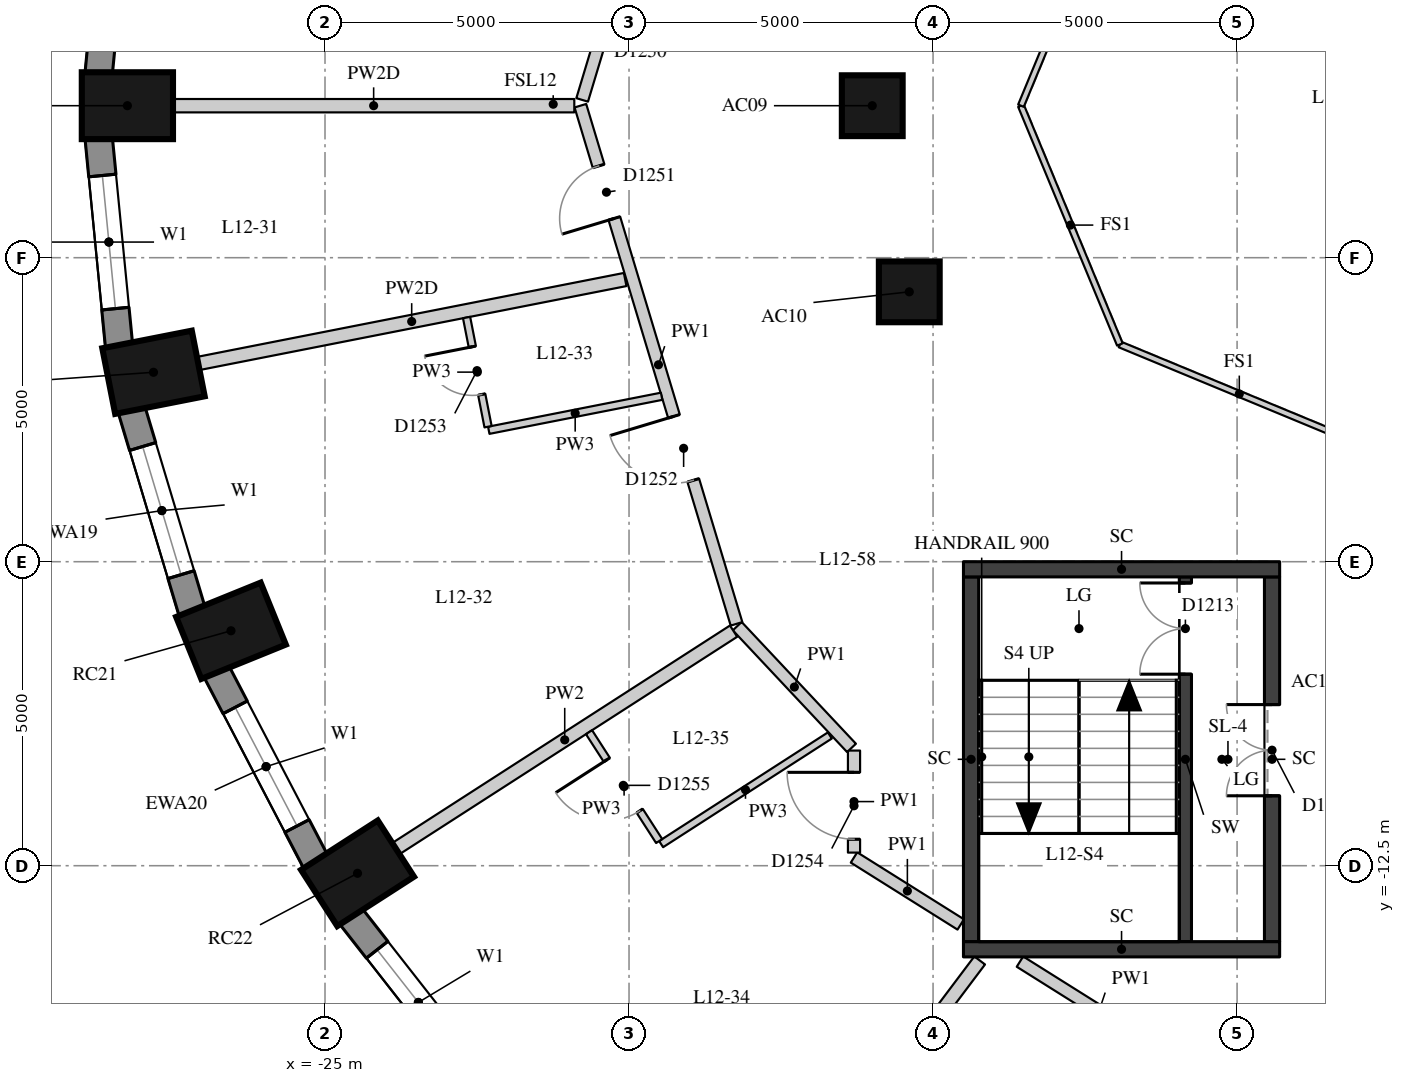
"""IFC4 building model, lengths in metres.
Left out: names, types, materials, properties, quantities, classifications, styles, units other than length and angle.
Written with IfcOpenShell. Run it as: python <this file> out.ifc"""

import sys

from ifc_helpers import new_model, si_unit, direction, frame, frame_2d, origin, origin_2d, place, context, subcontext, project, spatial, rectangle, extrude, element, fill, save


model = new_model("IFC4")
c1 = context("Model", 3, precision=1e-05, world=origin(), true_north=direction((0.0, 1.0)))
c2 = subcontext(c1, "Body", "Model", "MODEL_VIEW")
j1 = project(units=[si_unit("LENGTHUNIT", "METRE"), si_unit("PLANEANGLEUNIT", "RADIAN")], contexts=[c1])
p1 = place(None, origin())
s1 = spatial("IfcSite", under=j1, at=p1, CompositionType="ELEMENT")
p2 = place(p1, origin())
s2 = spatial("IfcBuilding", under=s1, at=p2, CompositionType="ELEMENT")
p3 = place(p2, frame((0.0, 0.0, 48.1)))
s3 = spatial("IfcBuildingStorey", under=s2, at=p3, CompositionType="ELEMENT", Elevation=48.1)
for number, where, z_axis, x_axis in (
    (1, (-28.25, 0.0, 0.0), (0.0, 0.0, 1.0), (-1.0, 0.0, 0.0)),
    (2, (-27.821, -4.385, 0.0), (0.0, 0.0, 1.0), (-0.981, -0.193, 0.0)),
    (3, (-26.546, -8.636, 0.0), (0.0, 0.0, 1.0), (-0.927, -0.376, 0.0)),
    (4, (-24.465, -12.625, 0.0), (0.0, 0.0, 1.0), (-0.841, -0.541, 0.0)),
):
    element("IfcColumn", number, at=place(p3, frame(where, z_axis=z_axis, x_axis=x_axis)), inside=s3, PredefinedType="COLUMN", context=c2, shape_type="SweptSolid", body=[
        extrude(rectangle(XDim=1.5, YDim=1.1, at=origin_2d()), origin(), (0.0, 0.0, 1.0), 3.3),
    ])
for number, where, z_axis, x_axis in (
    (5, (-16.0, 0.0, 0.0), (0.0, 0.0, 1.0), (1.0, 0.0, 0.0)),
    (6, (-15.391, -3.062, 0.0), (0.0, 0.0, 1.0), (1.0, 0.0, 0.0)),
):
    element("IfcColumn", number, at=place(p3, frame(where, z_axis=z_axis, x_axis=x_axis)), inside=s3, PredefinedType="COLUMN", context=c2, shape_type="SweptSolid", body=[
        extrude(rectangle(XDim=1.0, YDim=1.0, at=origin_2d()), origin(), (0.0, 0.0, 1.0), 3.3),
    ])
p4 = place(p3, frame((-28.387, 3.956, 0.0), z_axis=(0.0, 0.0, 1.0), x_axis=(-0.097389581596, -0.995246336038, 0.0)))
e7 = element("IfcWall", 7, at=p4, inside=s3, PredefinedType="SOLIDWALL", context=c2, shape_type="SweptSolid", body=[
    extrude(rectangle(XDim=3.442, YDim=0.45, at=frame_2d((1.721, 0.0))), origin(), (0.0, 0.0, 1.0), 3.02),
])
p5 = place(p4, frame((0.621, 0.0, 0.4)))
e8 = element("IfcOpeningElement", 8, at=p5, cuts=e7, PredefinedType="OPENING", context=c2, shape_type="SweptSolid", body=[
    extrude(rectangle(XDim=2.2, YDim=1.75, at=frame_2d((1.1, 0.875))), frame((0.0, 0.235, 0.0), z_axis=(0.0, -1.0, 0.0), x_axis=(1.0, 0.0, 0.0)), (0.0, 0.0, 1.0), 0.47),
])
p6 = place(p3, frame((-28.722, -0.53, 0.0), z_axis=(0.0, 0.0, 1.0), x_axis=(0.097389581596, -0.995246336038, 0.0)))
e9 = element("IfcWall", 9, at=p6, inside=s3, PredefinedType="SOLIDWALL", context=c2, shape_type="SweptSolid", body=[
    extrude(rectangle(XDim=3.442, YDim=0.45, at=frame_2d((1.721, 0.0))), origin(), (0.0, 0.0, 1.0), 3.02),
])
p7 = place(p6, frame((0.621, 0.0, 0.4)))
e10 = element("IfcOpeningElement", 10, at=p7, cuts=e9, PredefinedType="OPENING", context=c2, shape_type="SweptSolid", body=[
    extrude(rectangle(XDim=2.2, YDim=1.75, at=frame_2d((1.1, 0.875))), frame((0.0, 0.235, 0.0), z_axis=(0.0, -1.0, 0.0), x_axis=(1.0, 0.0, 0.0)), (0.0, 0.0, 1.0), 0.47),
])
p8 = place(p3, frame((-28.182, -4.996, 0.0), z_axis=(0.0, 0.0, 1.0), x_axis=(0.287064133733, -0.957911364963, 0.0)))
e11 = element("IfcWall", 11, at=p8, inside=s3, PredefinedType="SOLIDWALL", context=c2, shape_type="SweptSolid", body=[
    extrude(rectangle(XDim=3.473, YDim=0.45, at=frame_2d((1.737, 0.0))), origin(), (0.0, 0.0, 1.0), 3.02),
])
p9 = place(p8, frame((0.637, 0.0, 0.4)))
e12 = element("IfcOpeningElement", 12, at=p9, cuts=e11, PredefinedType="OPENING", context=c2, shape_type="SweptSolid", body=[
    extrude(rectangle(XDim=2.2, YDim=1.75, at=frame_2d((1.1, 0.875))), frame((0.0, 0.235, 0.0), z_axis=(0.0, -1.0, 0.0), x_axis=(1.0, 0.0, 0.0)), (0.0, 0.0, 1.0), 0.47),
])
p10 = place(p3, frame((-26.786, -9.305, 0.0), z_axis=(0.0, 0.0, 1.0), x_axis=(0.462492775226, -0.886623050041, 0.0)))
e13 = element("IfcWall", 13, at=p10, inside=s3, PredefinedType="SOLIDWALL", context=c2, shape_type="SweptSolid", body=[
    extrude(rectangle(XDim=3.532, YDim=0.45, at=frame_2d((1.766, 0.0))), origin(), (0.0, 0.0, 1.0), 3.02),
])
p11 = place(p10, frame((0.666, 0.0, 0.4)))
e14 = element("IfcOpeningElement", 14, at=p11, cuts=e13, PredefinedType="OPENING", context=c2, shape_type="SweptSolid", body=[
    extrude(rectangle(XDim=2.2, YDim=1.75, at=frame_2d((1.1, 0.875))), frame((0.0, 0.235, 0.0), z_axis=(0.0, -1.0, 0.0), x_axis=(1.0, 0.0, 0.0)), (0.0, 0.0, 1.0), 0.47),
])
p12 = place(p3, frame((-24.578, -13.328, 0.0), z_axis=(0.0, 0.0, 1.0), x_axis=(0.616661975264, -0.787228053529, 0.0)))
e15 = element("IfcWall", 15, at=p12, inside=s3, PredefinedType="SOLIDWALL", context=c2, shape_type="SweptSolid", body=[
    extrude(rectangle(XDim=3.61, YDim=0.45, at=frame_2d((1.805, 0.0))), origin(), (0.0, 0.0, 1.0), 3.02),
])
p13 = place(p12, frame((0.705, 0.0, 0.4)))
e16 = element("IfcOpeningElement", 16, at=p13, cuts=e15, PredefinedType="OPENING", context=c2, shape_type="SweptSolid", body=[
    extrude(rectangle(XDim=2.2, YDim=1.75, at=frame_2d((1.1, 0.875))), frame((0.0, 0.235, 0.0), z_axis=(0.0, -1.0, 0.0), x_axis=(1.0, 0.0, 0.0)), (0.0, 0.0, 1.0), 0.47),
])
p14 = place(p3, frame((-10.85, -13.75, 0.0), z_axis=(0.0, 0.0, 1.0), x_axis=(0.0, 1.0, 0.0)))
e17 = element("IfcWall", 17, at=p14, inside=s3, PredefinedType="SHEAR", context=c2, shape_type="SweptSolid", body=[
    extrude(rectangle(XDim=6.0, YDim=0.2, at=frame_2d((3.0, 0.0))), origin(), (0.0, 0.0, 1.0), 3.02),
])
p15 = place(p14, frame((4.4, 0.0, 0.0)))
e18 = element("IfcOpeningElement", 18, at=p15, cuts=e17, PredefinedType="OPENING", context=c2, shape_type="SweptSolid", body=[
    extrude(rectangle(XDim=1.5, YDim=2.1, at=frame_2d((0.75, 1.05))), frame((0.0, 0.11, 0.0), z_axis=(0.0, -1.0, 0.0), x_axis=(1.0, 0.0, 0.0)), (0.0, 0.0, 1.0), 0.22),
])
p16 = place(p3, frame((-14.375, -13.75, -0.28), z_axis=(0.0, 0.0, 1.0), x_axis=(0.0, 1.0, 0.0)))
e19 = element("IfcWall", 19, at=p16, inside=s3, PredefinedType="SHEAR", context=c2, shape_type="SweptSolid", body=[
    extrude(rectangle(XDim=6.0, YDim=0.25, at=frame_2d((3.0, 0.0))), origin(), (0.0, 0.0, 1.0), 3.3),
])
p17 = place(p3, frame((-9.425, -13.75, -0.28), z_axis=(0.0, 0.0, 1.0), x_axis=(0.0, 1.0, 0.0)))
e20 = element("IfcWall", 20, at=p17, inside=s3, PredefinedType="SHEAR", context=c2, shape_type="SweptSolid", body=[
    extrude(rectangle(XDim=6.0, YDim=0.25, at=frame_2d((3.0, 0.0))), origin(), (0.0, 0.0, 1.0), 3.3),
])
p18 = place(p17, frame((2.4, 0.0, 0.28)))
e21 = element("IfcOpeningElement", 21, at=p18, cuts=e20, PredefinedType="OPENING", context=c2, shape_type="SweptSolid", body=[
    extrude(rectangle(XDim=1.5, YDim=2.1, at=frame_2d((0.75, 1.05))), frame((0.0, 0.135, 0.0), z_axis=(0.0, -1.0, 0.0), x_axis=(1.0, 0.0, 0.0)), (0.0, 0.0, 1.0), 0.27),
])
for number, where, z_axis, x_axis in (
    (22, (-14.5, -7.625, -0.28), (0.0, 0.0, 1.0), (1.0, 0.0, 0.0)),
    (23, (-14.5, -13.875, -0.28), (0.0, 0.0, 1.0), (1.0, 0.0, 0.0)),
):
    element("IfcWall", number, at=place(p3, frame(where, z_axis=z_axis, x_axis=x_axis)), inside=s3, PredefinedType="SHEAR", context=c2, shape_type="SweptSolid", body=[
        extrude(rectangle(XDim=5.2, YDim=0.25, at=frame_2d((2.6, 0.0))), origin(), (0.0, 0.0, 1.0), 3.3),
    ])
p19 = place(p3, frame((-14.545, -13.466, 0.0), z_axis=(0.0, 0.0, 1.0), x_axis=(-0.846977572949, 0.53162862124, 0.0)))
e24 = element("IfcWall", 24, at=p19, inside=s3, PredefinedType="PARTITIONING", context=c2, shape_type="SweptSolid", body=[
    extrude(rectangle(XDim=2.073, YDim=0.2, at=frame_2d((1.036, 0.0))), origin(), (0.0, 0.0, 1.0), 3.02),
])
p20 = place(p3, frame((-16.3, -12.284, 0.0), z_axis=(0.0, 0.0, 1.0), x_axis=(0.0, 1.0, 0.0)))
e25 = element("IfcWall", 25, at=p20, inside=s3, PredefinedType="PARTITIONING", context=c2, shape_type="SweptSolid", body=[
    extrude(rectangle(XDim=1.678, YDim=0.2, at=frame_2d((0.839, 0.0))), origin(), (0.0, 0.0, 1.0), 3.02),
])
p21 = place(p20, frame((0.22, 0.0, 0.0)))
e26 = element("IfcOpeningElement", 26, at=p21, cuts=e25, PredefinedType="OPENING", context=c2, shape_type="SweptSolid", body=[
    extrude(rectangle(XDim=1.1, YDim=2.1, at=frame_2d((0.55, 1.05))), frame((0.0, 0.11, 0.0), z_axis=(0.0, -1.0, 0.0), x_axis=(1.0, 0.0, 0.0)), (0.0, 0.0, 1.0), 0.22),
])
p22 = place(p3, frame((-16.341, -10.562, 0.0), z_axis=(0.0, 0.0, 1.0), x_axis=(-0.684393472021, 0.729112868803, 0.0)))
e27 = element("IfcWall", 27, at=p22, inside=s3, PredefinedType="PARTITIONING", context=c2, shape_type="SweptSolid", body=[
    extrude(rectangle(XDim=2.746, YDim=0.2, at=frame_2d((1.373, 0.0))), origin(), (0.0, 0.0, 1.0), 3.02),
])
p23 = place(p3, frame((-18.232, -8.522, 0.0), z_axis=(0.0, 0.0, 1.0), x_axis=(-0.288502732396, 0.957479072043, 0.0)))
e28 = element("IfcWall", 28, at=p23, inside=s3, PredefinedType="PARTITIONING", context=c2, shape_type="SweptSolid", body=[
    extrude(rectangle(XDim=8.901, YDim=0.2, at=frame_2d((4.45, 0.0))), origin(), (0.0, 0.0, 1.0), 3.02),
])
p24 = place(p23, frame((6.965, 0.0, 0.0)))
e29 = element("IfcOpeningElement", 29, at=p24, cuts=e28, PredefinedType="OPENING", context=c2, shape_type="SweptSolid", body=[
    extrude(rectangle(XDim=0.9, YDim=2.1, at=frame_2d((0.45, 1.05))), frame((0.0, 0.11, 0.0), z_axis=(0.0, -1.0, 0.0), x_axis=(1.0, 0.0, 0.0)), (0.0, 0.0, 1.0), 0.22),
])
p25 = place(p23, frame((2.465, 0.0, 0.0)))
e30 = element("IfcOpeningElement", 30, at=p25, cuts=e28, PredefinedType="OPENING", context=c2, shape_type="SweptSolid", body=[
    extrude(rectangle(XDim=1.1, YDim=2.1, at=frame_2d((0.55, 1.05))), frame((0.0, 0.11, 0.0), z_axis=(0.0, -1.0, 0.0), x_axis=(1.0, 0.0, 0.0)), (0.0, 0.0, 1.0), 0.22),
])
p26 = place(p3, frame((-20.771, 0.095, 0.0), z_axis=(0.0, 0.0, 1.0), x_axis=(0.288464952331, 0.957490454927, 0.0)))
e31 = element("IfcWall", 31, at=p26, inside=s3, PredefinedType="PARTITIONING", context=c2, shape_type="SweptSolid", body=[
    extrude(rectangle(XDim=8.841, YDim=0.2, at=frame_2d((4.42, 0.0))), origin(), (0.0, 0.0, 1.0), 3.02),
])
p27 = place(p26, frame((7.521, 0.0, 0.0)))
e32 = element("IfcOpeningElement", 32, at=p27, cuts=e31, PredefinedType="OPENING", context=c2, shape_type="SweptSolid", body=[
    extrude(rectangle(XDim=1.1, YDim=2.1, at=frame_2d((0.55, 1.05))), frame((0.0, 0.11, 0.0), z_axis=(0.0, -1.0, 0.0), x_axis=(1.0, 0.0, 0.0)), (0.0, 0.0, 1.0), 0.22),
])
p28 = place(p26, frame((0.877, 0.0, 0.0)))
e33 = element("IfcOpeningElement", 33, at=p28, cuts=e31, PredefinedType="OPENING", context=c2, shape_type="SweptSolid", body=[
    extrude(rectangle(XDim=0.9, YDim=2.1, at=frame_2d((0.45, 1.05))), frame((0.0, 0.11, 0.0), z_axis=(0.0, -1.0, 0.0), x_axis=(1.0, 0.0, 0.0)), (0.0, 0.0, 1.0), 0.22),
])
p29 = place(p3, frame((-10.972, -15.708, 0.0), z_axis=(0.0, 0.0, 1.0), x_axis=(-0.846954991261, 0.53166459613, 0.0)))
e34 = element("IfcWall", 34, at=p29, inside=s3, PredefinedType="PARTITIONING", context=c2, shape_type="SweptSolid", body=[
    extrude(rectangle(XDim=3.068, YDim=0.2, at=frame_2d((1.534, 0.0))), origin(), (0.0, 0.0, 1.0), 3.02),
])
p30 = place(p3, frame((-27.5, 0.0, 0.0), z_axis=(0.0, 0.0, 1.0), x_axis=(1.0, 0.0, 0.0)))
e35 = element("IfcWall", 35, at=p30, inside=s3, PredefinedType="PARTITIONING", context=c2, shape_type="SweptSolid", body=[
    extrude(rectangle(XDim=6.6, YDim=0.22, at=frame_2d((3.3, 0.0))), origin(), (0.0, 0.0, 1.0), 2.47),
])
p31 = place(p3, frame((-27.085, -4.24, 0.0), z_axis=(0.0, 0.0, 1.0), x_axis=(0.981197740145, 0.193005167635, 0.0)))
e36 = element("IfcWall", 36, at=p31, inside=s3, PredefinedType="PARTITIONING", context=c2, shape_type="SweptSolid", body=[
    extrude(rectangle(XDim=7.156, YDim=0.22, at=frame_2d((3.578, 0.0))), origin(), (0.0, 0.0, 1.0), 2.47),
])
p32 = place(p3, frame((-23.835, -12.219, 0.0), z_axis=(0.0, 0.0, 1.0), x_axis=(0.840757959101, 0.541411169268, 0.0)))
e37 = element("IfcWall", 37, at=p32, inside=s3, PredefinedType="PARTITIONING", context=c2, shape_type="SweptSolid", body=[
    extrude(rectangle(XDim=6.606, YDim=0.22, at=frame_2d((3.303, 0.0))), origin(), (0.0, 0.0, 1.0), 3.02),
])
p33 = place(p3, frame((-16.927, -17.638, 0.0), z_axis=(0.0, 0.0, 1.0), x_axis=(0.601158965663, 0.799129462605, 0.0)))
e38 = element("IfcWall", 38, at=p33, inside=s3, PredefinedType="PARTITIONING", context=c2, shape_type="SweptSolid", body=[
    extrude(rectangle(XDim=4.48, YDim=0.22, at=frame_2d((2.24, 0.0))), origin(), (0.0, 0.0, 1.0), 2.57),
])
p34 = place(p3, frame((-19.464, -4.779, 0.0), z_axis=(0.0, 0.0, 1.0), x_axis=(-0.981185297697, -0.193068411666, 0.0)))
e39 = element("IfcWall", 39, at=p34, inside=s3, PredefinedType="PARTITIONING", context=c2, shape_type="SweptSolid", body=[
    extrude(rectangle(XDim=2.897, YDim=0.12, at=frame_2d((1.448, 0.0))), origin(), (0.0, 0.0, 1.0), 3.02),
])
p35 = place(p3, frame((-16.697, -10.358, 0.0), z_axis=(0.0, 0.0, 1.0), x_axis=(-0.84073116979, -0.541452768156, 0.0)))
e40 = element("IfcWall", 40, at=p35, inside=s3, PredefinedType="PARTITIONING", context=c2, shape_type="SweptSolid", body=[
    extrude(rectangle(XDim=3.301, YDim=0.12, at=frame_2d((1.65, 0.0))), origin(), (0.0, 0.0, 1.0), 3.02),
])
p36 = place(p3, frame((-22.318, -5.28, 0.0), z_axis=(0.0, 0.0, 1.0), x_axis=(-0.193036598643, 0.981191557029, 0.0)))
e41 = element("IfcWall", 41, at=p36, inside=s3, PredefinedType="PARTITIONING", context=c2, shape_type="SweptSolid", body=[
    extrude(rectangle(XDim=1.83, YDim=0.12, at=frame_2d((0.915, 0.0))), origin(), (0.0, 0.0, 1.0), 3.02),
])
p37 = place(p36, frame((0.54, 0.0, 0.0)))
e42 = element("IfcOpeningElement", 42, at=p37, cuts=e41, PredefinedType="OPENING", context=c2, shape_type="SweptSolid", body=[
    extrude(rectangle(XDim=0.8, YDim=2.1, at=frame_2d((0.4, 1.05))), frame((0.0, 0.07, 0.0), z_axis=(0.0, -1.0, 0.0), x_axis=(1.0, 0.0, 0.0)), (0.0, 0.0, 1.0), 0.14),
])
p38 = place(p3, frame((-19.504, -12.095, 0.0), z_axis=(0.0, 0.0, 1.0), x_axis=(-0.541591545821, 0.840641777153, 0.0)))
e43 = element("IfcWall", 43, at=p38, inside=s3, PredefinedType="PARTITIONING", context=c2, shape_type="SweptSolid", body=[
    extrude(rectangle(XDim=2.13, YDim=0.12, at=frame_2d((1.065, 0.0))), origin(), (0.0, 0.0, 1.0), 3.02),
])
p39 = place(p38, frame((0.59, 0.0, 0.0)))
e44 = element("IfcOpeningElement", 44, at=p39, cuts=e43, PredefinedType="OPENING", context=c2, shape_type="SweptSolid", body=[
    extrude(rectangle(XDim=1.0, YDim=2.1, at=frame_2d((0.5, 1.05))), frame((0.0, 0.07, 0.0), z_axis=(0.0, -1.0, 0.0), x_axis=(1.0, 0.0, 0.0)), (0.0, 0.0, 1.0), 0.14),
])
for number, where, z_axis, x_axis in (
    (45, (-8.0, -5.554, 0.0), (0.0, 0.0, 1.0), (-0.924, 0.383, 0.0)),
    (46, (-11.927, -3.927, 0.0), (0.0, 0.0, 1.0), (-0.383, 0.924, 0.0)),
    (47, (-13.554, 0.0, 0.0), (0.0, 0.0, 1.0), (0.383, 0.924, 0.0)),
):
    element("IfcWall", number, at=place(p3, frame(where, z_axis=z_axis, x_axis=x_axis)), inside=s3, PredefinedType="PARTITIONING", context=c2, shape_type="SweptSolid", body=[
        extrude(rectangle(XDim=4.251, YDim=0.1, at=frame_2d((2.125, 0.0))), origin(), (0.0, 0.0, 1.0), 3.02),
    ])
p40 = place(p7, origin())
e48 = element("IfcWindow", 48, at=p40, inside=s3, PartitioningType="SINGLE_PANEL", PredefinedType="WINDOW", context=c2, shape_type="SweptSolid", body=[
    extrude(rectangle(XDim=2.2, YDim=1.75, at=frame_2d((1.1, 0.875))), frame((0.0, 0.035, 0.0), z_axis=(0.0, -1.0, 0.0), x_axis=(1.0, 0.0, 0.0)), (0.0, 0.0, 1.0), 0.06),
])
fill(e10, e48)
p41 = place(p9, origin())
e49 = element("IfcWindow", 49, at=p41, inside=s3, PartitioningType="SINGLE_PANEL", PredefinedType="WINDOW", context=c2, shape_type="SweptSolid", body=[
    extrude(rectangle(XDim=2.2, YDim=1.75, at=frame_2d((1.1, 0.875))), frame((0.0, 0.035, 0.0), z_axis=(0.0, -1.0, 0.0), x_axis=(1.0, 0.0, 0.0)), (0.0, 0.0, 1.0), 0.06),
])
fill(e12, e49)
p42 = place(p11, origin())
e50 = element("IfcWindow", 50, at=p42, inside=s3, PartitioningType="SINGLE_PANEL", PredefinedType="WINDOW", context=c2, shape_type="SweptSolid", body=[
    extrude(rectangle(XDim=2.2, YDim=1.75, at=frame_2d((1.1, 0.875))), frame((0.0, 0.035, 0.0), z_axis=(0.0, -1.0, 0.0), x_axis=(1.0, 0.0, 0.0)), (0.0, 0.0, 1.0), 0.06),
])
fill(e14, e50)
p43 = place(p13, origin())
e51 = element("IfcWindow", 51, at=p43, inside=s3, PartitioningType="SINGLE_PANEL", PredefinedType="WINDOW", context=c2, shape_type="SweptSolid", body=[
    extrude(rectangle(XDim=2.2, YDim=1.75, at=frame_2d((1.1, 0.875))), frame((0.0, 0.035, 0.0), z_axis=(0.0, -1.0, 0.0), x_axis=(1.0, 0.0, 0.0)), (0.0, 0.0, 1.0), 0.06),
])
fill(e16, e51)
p44 = place(p15, origin())
e52 = element("IfcDoor", 52, at=p44, inside=s3, OperationType="DOUBLE_DOOR_SINGLE_SWING", PredefinedType="DOOR", context=c2, shape_type="SweptSolid", body=[
    extrude(rectangle(XDim=1.5, YDim=2.1, at=frame_2d((0.75, 1.05))), frame((0.0, 0.025, 0.0), z_axis=(0.0, -1.0, 0.0), x_axis=(1.0, 0.0, 0.0)), (0.0, 0.0, 1.0), 0.05),
])
fill(e18, e52)
p45 = place(p18, origin())
e53 = element("IfcDoor", 53, at=p45, inside=s3, OperationType="DOUBLE_DOOR_SINGLE_SWING", PredefinedType="DOOR", context=c2, shape_type="SweptSolid", body=[
    extrude(rectangle(XDim=1.5, YDim=2.1, at=frame_2d((0.75, 1.05))), frame((0.0, 0.025, 0.0), z_axis=(0.0, -1.0, 0.0), x_axis=(1.0, 0.0, 0.0)), (0.0, 0.0, 1.0), 0.05),
])
fill(e21, e53)
p46 = place(p24, origin())
e54 = element("IfcDoor", 54, at=p46, inside=s3, OperationType="SINGLE_SWING_LEFT", PredefinedType="DOOR", context=c2, shape_type="SweptSolid", body=[
    extrude(rectangle(XDim=0.9, YDim=2.1, at=frame_2d((0.45, 1.05))), frame((0.0, 0.025, 0.0), z_axis=(0.0, -1.0, 0.0), x_axis=(1.0, 0.0, 0.0)), (0.0, 0.0, 1.0), 0.05),
])
fill(e29, e54)
p47 = place(p25, origin())
e55 = element("IfcDoor", 55, at=p47, inside=s3, OperationType="SINGLE_SWING_RIGHT", PredefinedType="DOOR", context=c2, shape_type="SweptSolid", body=[
    extrude(rectangle(XDim=1.1, YDim=2.1, at=frame_2d((0.55, 1.05))), frame((0.0, 0.025, 0.0), z_axis=(0.0, -1.0, 0.0), x_axis=(1.0, 0.0, 0.0)), (0.0, 0.0, 1.0), 0.05),
])
fill(e30, e55)
p48 = place(p37, origin())
e56 = element("IfcDoor", 56, at=p48, inside=s3, OperationType="SINGLE_SWING_RIGHT", PredefinedType="DOOR", context=c2, shape_type="SweptSolid", body=[
    extrude(rectangle(XDim=0.8, YDim=2.1, at=frame_2d((0.4, 1.05))), frame((0.0, 0.025, 0.0), z_axis=(0.0, -1.0, 0.0), x_axis=(1.0, 0.0, 0.0)), (0.0, 0.0, 1.0), 0.05),
])
fill(e42, e56)
p49 = place(p21, origin())
e57 = element("IfcDoor", 57, at=p49, inside=s3, OperationType="SINGLE_SWING_RIGHT", PredefinedType="DOOR", context=c2, shape_type="SweptSolid", body=[
    extrude(rectangle(XDim=1.1, YDim=2.1, at=frame_2d((0.55, 1.05))), frame((0.0, 0.025, 0.0), z_axis=(0.0, -1.0, 0.0), x_axis=(1.0, 0.0, 0.0)), (0.0, 0.0, 1.0), 0.05),
])
fill(e26, e57)
p50 = place(p39, origin())
e58 = element("IfcDoor", 58, at=p50, inside=s3, OperationType="SINGLE_SWING_RIGHT", PredefinedType="DOOR", context=c2, shape_type="SweptSolid", body=[
    extrude(rectangle(XDim=1.0, YDim=2.1, at=frame_2d((0.5, 1.05))), frame((0.0, 0.025, 0.0), z_axis=(0.0, -1.0, 0.0), x_axis=(1.0, 0.0, 0.0)), (0.0, 0.0, 1.0), 0.05),
])
fill(e44, e58)
save(model, sys.argv[1])
